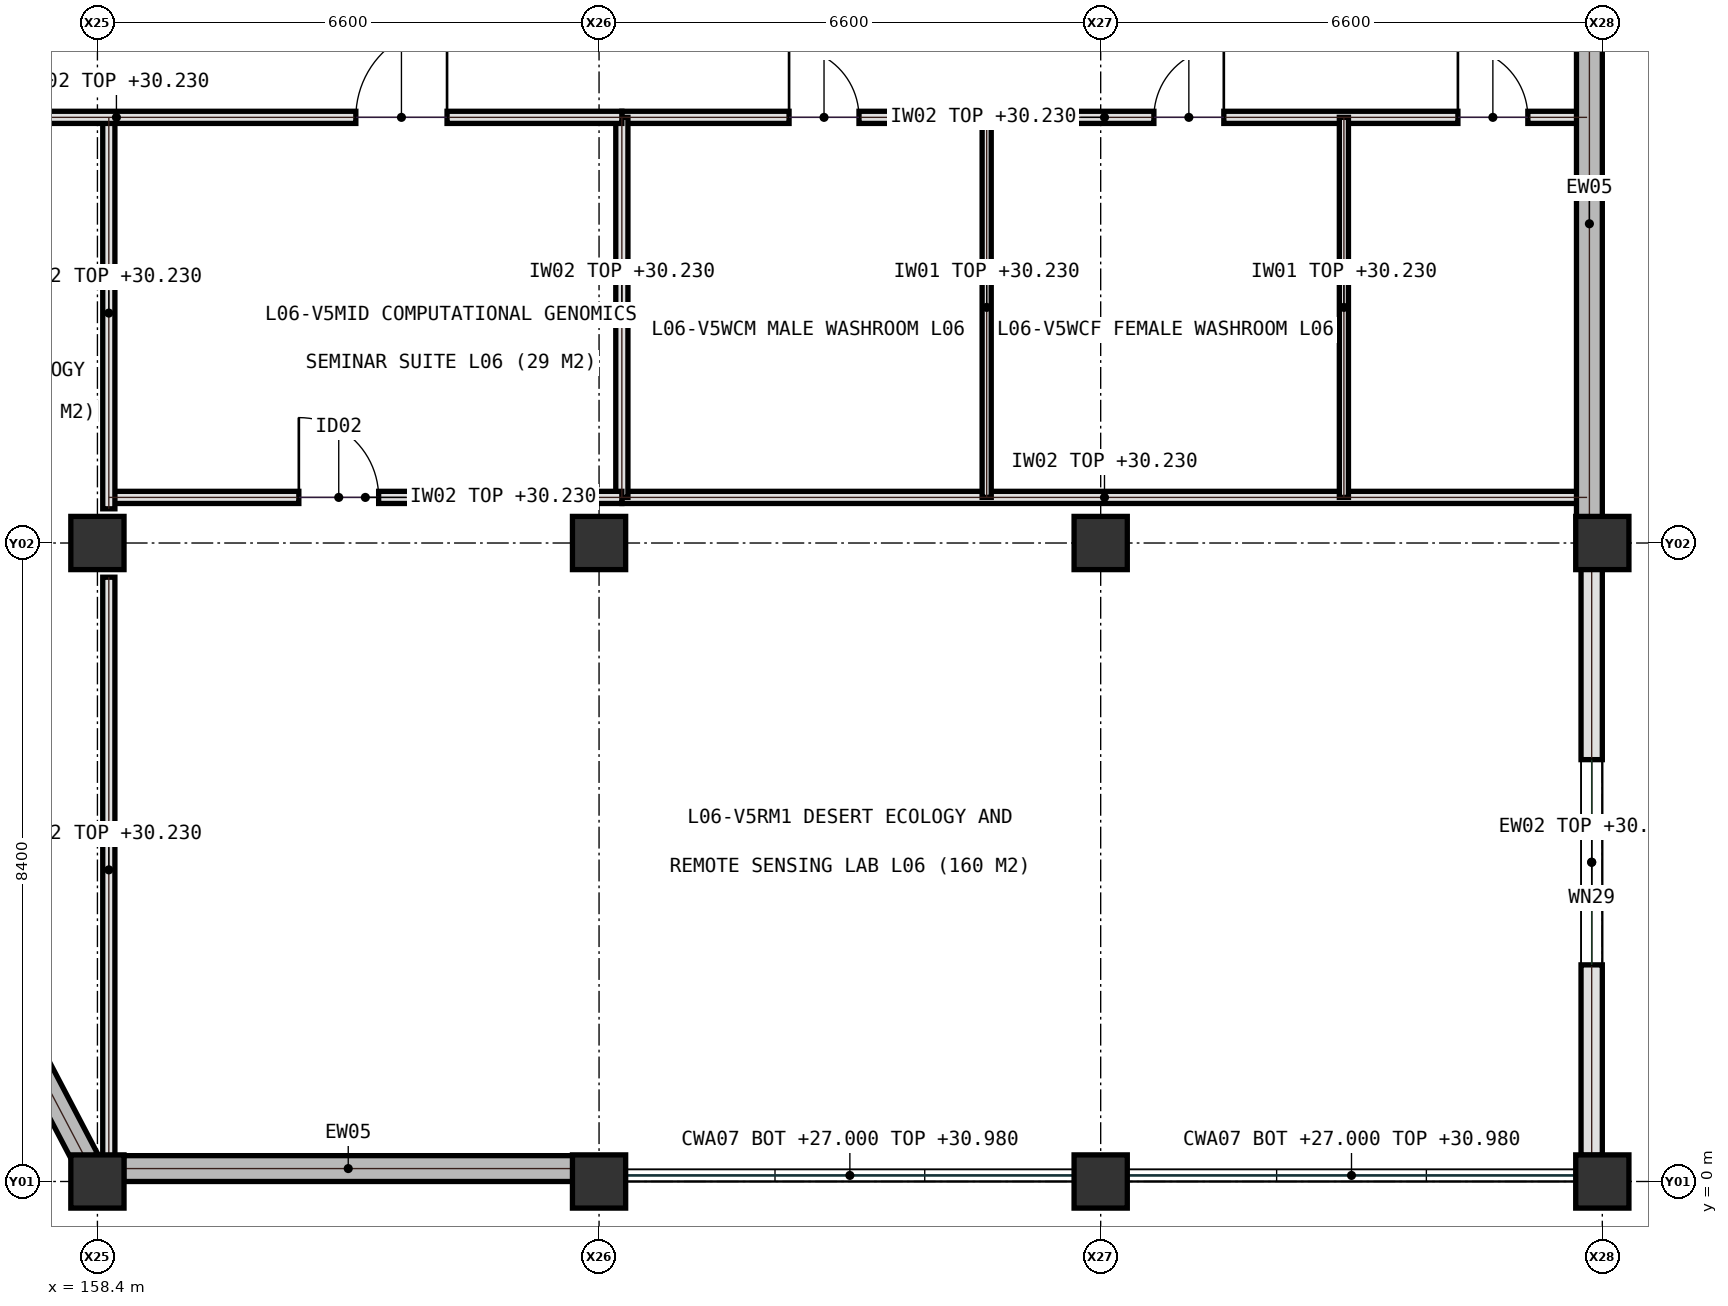
"""IFC4 building model, lengths in metres.
Left out: names, types, materials, properties, quantities, classifications, styles, units other than length and angle.
Written with IfcOpenShell. Run it as: python <this file> out.ifc"""

import sys

from ifc_helpers import new_model, si_unit, direction, frame, frame_2d, origin, origin_2d, place, context, subcontext, project, spatial, rectangle, extrude, element, fill, save


model = new_model("IFC4")
c1 = context("Model", 3, precision=1e-05, world=origin(), true_north=direction((0.0, 1.0)))
c2 = subcontext(c1, "Body", "Model", "MODEL_VIEW")
j1 = project(units=[si_unit("LENGTHUNIT", "METRE"), si_unit("PLANEANGLEUNIT", "RADIAN")], contexts=[c1])
p1 = place(None, origin())
s1 = spatial("IfcSite", under=j1, at=p1, CompositionType="ELEMENT")
p2 = place(p1, origin())
s2 = spatial("IfcBuilding", under=s1, at=p2, CompositionType="ELEMENT")
p3 = place(p2, frame((0.0, 0.0, 27.0)))
s3 = spatial("IfcBuildingStorey", under=s2, at=p3, CompositionType="ELEMENT", Elevation=27.0)
for number, where, z_axis, x_axis in (
    (1, (158.4, 0.0, 0.0), (0.0, 0.0, 1.0), (1.0, 0.0, 0.0)),
    (2, (158.4, 8.4, 0.0), (0.0, 0.0, 1.0), (1.0, 0.0, 0.0)),
    (3, (165.0, 0.0, 0.0), (0.0, 0.0, 1.0), (1.0, 0.0, 0.0)),
    (4, (165.0, 8.4, 0.0), (0.0, 0.0, 1.0), (1.0, 0.0, 0.0)),
    (5, (171.6, 0.0, 0.0), (0.0, 0.0, 1.0), (1.0, 0.0, 0.0)),
    (6, (171.6, 8.4, 0.0), (0.0, 0.0, 1.0), (1.0, 0.0, 0.0)),
    (7, (178.2, 0.0, 0.0), (0.0, 0.0, 1.0), (1.0, 0.0, 0.0)),
    (8, (178.2, 8.4, 0.0), (0.0, 0.0, 1.0), (1.0, 0.0, 0.0)),
):
    element("IfcColumn", number, at=place(p3, frame(where, z_axis=z_axis, x_axis=x_axis)), inside=s3, PredefinedType="COLUMN", context=c2, shape_type="SweptSolid", body=[
        extrude(rectangle(XDim=0.7, YDim=0.7, at=origin_2d()), origin(), (0.0, 0.0, 1.0), 4.2),
    ])
p4 = place(p3, frame((165.3, 14.0, 0.0), z_axis=(0.0, 0.0, 1.0), x_axis=(1.0, 0.0, 0.0)))
e9 = element("IfcWall", 9, at=p4, inside=s3, PredefinedType="PARTITIONING", context=c2, shape_type="SweptSolid", body=[
    extrude(rectangle(XDim=12.7, YDim=0.16, at=frame_2d((6.35, 0.0))), origin(), (0.0, 0.0, 1.0), 3.23),
])
p5 = place(p4, frame((2.2, 0.0, 0.0)))
e10 = element("IfcOpeningElement", 10, at=p5, cuts=e9, PredefinedType="OPENING", context=c2, shape_type="SweptSolid", body=[
    extrude(rectangle(XDim=0.92, YDim=2.08, at=frame_2d((0.46, 1.04))), frame((0.0, 0.09, 0.0), z_axis=(0.0, -1.0, 0.0), x_axis=(1.0, 0.0, 0.0)), (0.0, 0.0, 1.0), 0.18),
])
p6 = place(p4, frame((7.0, 0.0, 0.0)))
e11 = element("IfcOpeningElement", 11, at=p6, cuts=e9, PredefinedType="OPENING", context=c2, shape_type="SweptSolid", body=[
    extrude(rectangle(XDim=0.92, YDim=2.08, at=frame_2d((0.46, 1.04))), frame((0.0, 0.09, 0.0), z_axis=(0.0, -1.0, 0.0), x_axis=(1.0, 0.0, 0.0)), (0.0, 0.0, 1.0), 0.18),
])
p7 = place(p4, frame((11.0, 0.0, 0.0)))
e12 = element("IfcOpeningElement", 12, at=p7, cuts=e9, PredefinedType="OPENING", context=c2, shape_type="SweptSolid", body=[
    extrude(rectangle(XDim=0.92, YDim=2.08, at=frame_2d((0.46, 1.04))), frame((0.0, 0.09, 0.0), z_axis=(0.0, -1.0, 0.0), x_axis=(1.0, 0.0, 0.0)), (0.0, 0.0, 1.0), 0.18),
])
p8 = place(p3, frame((165.3, 9.0, 0.0), z_axis=(0.0, 0.0, 1.0), x_axis=(1.0, 0.0, 0.0)))
e13 = element("IfcWall", 13, at=p8, inside=s3, PredefinedType="PARTITIONING", context=c2, shape_type="SweptSolid", body=[
    extrude(rectangle(XDim=12.7, YDim=0.16, at=frame_2d((6.35, 0.0))), origin(), (0.0, 0.0, 1.0), 3.23),
])
p9 = place(p3, frame((165.3, 9.0, 0.0), z_axis=(0.0, 0.0, 1.0), x_axis=(0.0, 1.0, 0.0)))
e14 = element("IfcWall", 14, at=p9, inside=s3, PredefinedType="PARTITIONING", context=c2, shape_type="SweptSolid", body=[
    extrude(rectangle(XDim=5.0, YDim=0.16, at=frame_2d((2.5, 0.0))), origin(), (0.0, 0.0, 1.0), 3.23),
])
for number, where, z_axis, x_axis in (
    (15, (170.1, 9.0, 0.0), (0.0, 0.0, 1.0), (0.0, 1.0, 0.0)),
    (16, (174.8, 9.0, 0.0), (0.0, 0.0, 1.0), (0.0, 1.0, 0.0)),
):
    element("IfcWall", number, at=place(p3, frame(where, z_axis=z_axis, x_axis=x_axis)), inside=s3, PredefinedType="PARTITIONING", context=c2, shape_type="SweptSolid", body=[
        extrude(rectangle(XDim=5.0, YDim=0.12, at=frame_2d((2.5, 0.0))), origin(), (0.0, 0.0, 1.0), 3.23),
    ])
p10 = place(p3, frame((158.55, 9.0, 0.0), z_axis=(0.0, 0.0, 1.0), x_axis=(1.0, 0.0, 0.0)))
e17 = element("IfcWall", 17, at=p10, inside=s3, PredefinedType="PARTITIONING", context=c2, shape_type="SweptSolid", body=[
    extrude(rectangle(XDim=6.75, YDim=0.16, at=frame_2d((3.375, 0.0))), origin(), (0.0, 0.0, 1.0), 3.23),
])
p11 = place(p10, frame((2.5, 0.0, 0.0)))
e18 = element("IfcOpeningElement", 18, at=p11, cuts=e17, PredefinedType="OPENING", context=c2, shape_type="SweptSolid", body=[
    extrude(rectangle(XDim=1.05, YDim=2.15, at=frame_2d((0.525, 1.075))), frame((0.0, 0.09, 0.0), z_axis=(0.0, -1.0, 0.0), x_axis=(1.0, 0.0, 0.0)), (0.0, 0.0, 1.0), 0.18),
])
p12 = place(p3, frame((158.55, 0.25, 0.0), z_axis=(0.0, 0.0, 1.0), x_axis=(0.0, 1.0, 0.0)))
e19 = element("IfcWall", 19, at=p12, inside=s3, PredefinedType="PARTITIONING", context=c2, shape_type="SweptSolid", body=[
    extrude(rectangle(XDim=7.7, YDim=0.16, at=frame_2d((3.85, 0.0))), origin(), (0.0, 0.0, 1.0), 3.23),
])
p13 = place(p3, frame((158.55, 8.85, 0.0), z_axis=(0.0, 0.0, 1.0), x_axis=(0.0, 1.0, 0.0)))
e20 = element("IfcWall", 20, at=p13, inside=s3, PredefinedType="PARTITIONING", context=c2, shape_type="SweptSolid", body=[
    extrude(rectangle(XDim=5.15, YDim=0.16, at=frame_2d((2.575, 0.0))), origin(), (0.0, 0.0, 1.0), 3.23),
])
p14 = place(p3, frame((152.0, 14.0, 0.0), z_axis=(0.0, 0.0, 1.0), x_axis=(1.0, 0.0, 0.0)))
e21 = element("IfcWall", 21, at=p14, inside=s3, PredefinedType="PARTITIONING", context=c2, shape_type="SweptSolid", body=[
    extrude(rectangle(XDim=13.3, YDim=0.16, at=frame_2d((6.65, 0.0))), origin(), (0.0, 0.0, 1.0), 3.23),
])
p15 = place(p14, frame((2.6, 0.0, 0.0)))
e22 = element("IfcOpeningElement", 22, at=p15, cuts=e21, PredefinedType="OPENING", context=c2, shape_type="SweptSolid", body=[
    extrude(rectangle(XDim=1.2, YDim=2.22, at=frame_2d((0.6, 1.11))), frame((0.0, 0.09, 0.0), z_axis=(0.0, -1.0, 0.0), x_axis=(1.0, 0.0, 0.0)), (0.0, 0.0, 1.0), 0.18),
])
p16 = place(p14, frame((9.8, 0.0, 0.0)))
e23 = element("IfcOpeningElement", 23, at=p16, cuts=e21, PredefinedType="OPENING", context=c2, shape_type="SweptSolid", body=[
    extrude(rectangle(XDim=1.2, YDim=2.22, at=frame_2d((0.6, 1.11))), frame((0.0, 0.09, 0.0), z_axis=(0.0, -1.0, 0.0), x_axis=(1.0, 0.0, 0.0)), (0.0, 0.0, 1.0), 0.18),
])
p17 = place(p3, frame((158.745, 0.17, 0.0), z_axis=(0.0, 0.0, 1.0), x_axis=(1.0, 0.0, 0.0)))
e24 = element("IfcWall", 24, at=p17, inside=s3, PredefinedType="SHEAR", context=c2, shape_type="SweptSolid", body=[
    extrude(rectangle(XDim=5.91, YDim=0.34, at=frame_2d((2.955, 0.0))), origin(), (0.0, 0.0, 1.0), 3.98),
])
p18 = place(p3, frame((178.06, 0.345, 0.0), z_axis=(0.0, 0.0, 1.0), x_axis=(0.0, 1.0, 0.0)))
e25 = element("IfcWall", 25, at=p18, inside=s3, PredefinedType="SOLIDWALL", context=c2, shape_type="SweptSolid", body=[
    extrude(rectangle(XDim=7.71, YDim=0.28, at=frame_2d((3.855, 0.0))), origin(), (0.0, 0.0, 1.0), 3.365),
])
p19 = place(p18, frame((2.505, 0.0, 0.95)))
e26 = element("IfcOpeningElement", 26, at=p19, cuts=e25, PredefinedType="OPENING", context=c2, shape_type="SweptSolid", body=[
    extrude(rectangle(XDim=2.7, YDim=2.05, at=frame_2d((1.35, 1.025))), frame((0.0, 0.15, 0.0), z_axis=(0.0, -1.0, 0.0), x_axis=(1.0, 0.0, 0.0)), (0.0, 0.0, 1.0), 0.3),
])
p20 = place(p3, frame((178.03, 8.745, 0.0), z_axis=(0.0, 0.0, 1.0), x_axis=(0.0, 1.0, 0.0)))
e27 = element("IfcWall", 27, at=p20, inside=s3, PredefinedType="SHEAR", context=c2, shape_type="SweptSolid", body=[
    extrude(rectangle(XDim=7.71, YDim=0.34, at=frame_2d((3.855, 0.0))), origin(), (0.0, 0.0, 1.0), 3.98),
])
p21 = place(p3, frame((155.25, 6.01, 0.0), z_axis=(0.0, 0.0, 1.0), x_axis=(0.464471613901, -0.885588007981, 0.0)))
e28 = element("IfcWall", 28, at=p21, inside=s3, PredefinedType="SHEAR", context=c2, shape_type="SweptSolid", body=[
    extrude(rectangle(XDim=6.459, YDim=0.34, at=frame_2d((3.229, 0.0))), origin(), (0.0, 0.0, 1.0), 3.98),
])
p22 = place(p5, origin())
e29 = element("IfcDoor", 29, at=p22, inside=s3, OperationType="SINGLE_SWING_LEFT", PredefinedType="DOOR", context=c2, shape_type="SweptSolid", body=[
    extrude(rectangle(XDim=0.92, YDim=2.08, at=frame_2d((0.46, 1.04))), frame((0.0, 0.025, 0.0), z_axis=(0.0, -1.0, 0.0), x_axis=(1.0, 0.0, 0.0)), (0.0, 0.0, 1.0), 0.05),
])
fill(e10, e29)
p23 = place(p6, origin())
e30 = element("IfcDoor", 30, at=p23, inside=s3, OperationType="SINGLE_SWING_RIGHT", PredefinedType="DOOR", context=c2, shape_type="SweptSolid", body=[
    extrude(rectangle(XDim=0.92, YDim=2.08, at=frame_2d((0.46, 1.04))), frame((0.0, 0.025, 0.0), z_axis=(0.0, -1.0, 0.0), x_axis=(1.0, 0.0, 0.0)), (0.0, 0.0, 1.0), 0.05),
])
fill(e11, e30)
p24 = place(p7, origin())
e31 = element("IfcDoor", 31, at=p24, inside=s3, OperationType="SINGLE_SWING_LEFT", PredefinedType="DOOR", context=c2, shape_type="SweptSolid", body=[
    extrude(rectangle(XDim=0.92, YDim=2.08, at=frame_2d((0.46, 1.04))), frame((0.0, 0.025, 0.0), z_axis=(0.0, -1.0, 0.0), x_axis=(1.0, 0.0, 0.0)), (0.0, 0.0, 1.0), 0.05),
])
fill(e12, e31)
p25 = place(p11, origin())
e32 = element("IfcDoor", 32, at=p25, inside=s3, OperationType="SINGLE_SWING_LEFT", PredefinedType="DOOR", context=c2, shape_type="SweptSolid", body=[
    extrude(rectangle(XDim=1.05, YDim=2.15, at=frame_2d((0.525, 1.075))), frame((0.0, 0.025, 0.0), z_axis=(0.0, -1.0, 0.0), x_axis=(1.0, 0.0, 0.0)), (0.0, 0.0, 1.0), 0.05),
])
fill(e18, e32)
p26 = place(p16, origin())
e33 = element("IfcDoor", 33, at=p26, inside=s3, OperationType="SINGLE_SWING_RIGHT", PredefinedType="DOOR", context=c2, shape_type="SweptSolid", body=[
    extrude(rectangle(XDim=1.2, YDim=2.22, at=frame_2d((0.6, 1.11))), frame((0.0, 0.025, 0.0), z_axis=(0.0, -1.0, 0.0), x_axis=(1.0, 0.0, 0.0)), (0.0, 0.0, 1.0), 0.05),
])
fill(e23, e33)
p27 = place(p19, origin())
e34 = element("IfcWindow", 34, at=p27, inside=s3, PartitioningType="SINGLE_PANEL", PredefinedType="WINDOW", context=c2, shape_type="SweptSolid", body=[
    extrude(rectangle(XDim=2.7, YDim=2.05, at=frame_2d((1.35, 1.025))), frame((0.0, 0.03, 0.0), z_axis=(0.0, -1.0, 0.0), x_axis=(1.0, 0.0, 0.0)), (0.0, 0.0, 1.0), 0.06),
])
fill(e26, e34)
save(model, sys.argv[1])
